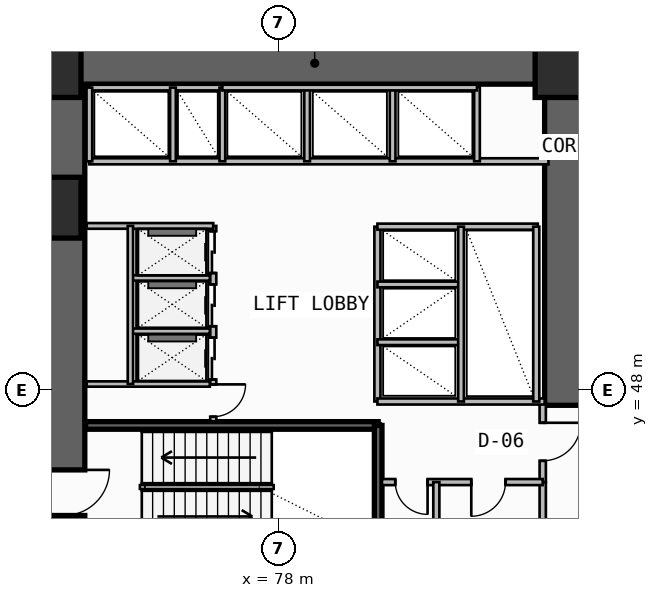
"""IFC4 building model, lengths in metres.
Left out: names, types, materials, properties, quantities, classifications, styles, units other than length and angle.
Written with IfcOpenShell. Run it as: python <this file> out.ifc"""

import sys

from ifc_helpers import new_model, si_unit, direction, frame, frame_2d, origin, origin_2d, place, context, subcontext, project, spatial, rectangle, extrude, element, fill, save


model = new_model("IFC4")
c1 = context("Model", 3, precision=1e-05, world=origin(), true_north=direction((0.0, 1.0)))
c2 = subcontext(c1, "Body", "Model", "MODEL_VIEW")
j1 = project(units=[si_unit("LENGTHUNIT", "METRE"), si_unit("PLANEANGLEUNIT", "RADIAN")], contexts=[c1])
p1 = place(None, origin())
s1 = spatial("IfcSite", under=j1, at=p1, CompositionType="ELEMENT")
p2 = place(p1, origin())
s2 = spatial("IfcBuilding", under=s1, at=p2, CompositionType="ELEMENT")
p3 = place(p2, frame((0.0, 0.0, 4.5)))
s3 = spatial("IfcBuildingStorey", under=s2, at=p3, CompositionType="ELEMENT", Elevation=4.5)
p4 = place(p3, frame((72.35, 43.35, -0.32), z_axis=(0.0, 0.0, 1.0), x_axis=(0.0, 1.0, 0.0)))
e1 = element("IfcWall", 1, at=p4, inside=s3, PredefinedType="SHEAR", context=c2, shape_type="SweptSolid", body=[
    extrude(rectangle(XDim=12.7, YDim=1.1, at=frame_2d((6.35, 0.0))), origin(), (0.0, 0.0, 1.0), 4.5),
])
p5 = place(p4, frame((1.35, 0.0, 0.32)))
e2 = element("IfcOpeningElement", 2, at=p5, cuts=e1, PredefinedType="OPENING", context=c2, shape_type="SweptSolid", body=[
    extrude(rectangle(XDim=1.2, YDim=2.2, at=frame_2d((0.6, 1.1))), frame((0.0, 0.56, 0.0), z_axis=(0.0, -1.0, 0.0), x_axis=(1.0, 0.0, 0.0)), (0.0, 0.0, 1.0), 1.12),
])
p6 = place(p3, frame((71.8, 56.6, -0.32), z_axis=(0.0, 0.0, 1.0), x_axis=(1.0, 0.0, 0.0)))
e3 = element("IfcWall", 3, at=p6, inside=s3, PredefinedType="SHEAR", context=c2, shape_type="SweptSolid", body=[
    extrude(rectangle(XDim=14.3, YDim=1.1, at=frame_2d((7.15, 0.0))), origin(), (0.0, 0.0, 1.0), 4.5),
])
p7 = place(p3, frame((85.55, 47.6, -0.32), z_axis=(0.0, 0.0, 1.0), x_axis=(0.0, 1.0, 0.0)))
e4 = element("IfcWall", 4, at=p7, inside=s3, PredefinedType="SHEAR", context=c2, shape_type="SweptSolid", body=[
    extrude(rectangle(XDim=8.45, YDim=1.1, at=frame_2d((4.225, 0.0))), origin(), (0.0, 0.0, 1.0), 4.5),
])
for number, where, z_axis, x_axis in (
    (5, (72.0, 52.8, 0.0), (0.0, 0.0, 1.0), (1.0, 0.0, 0.0)),
    (6, (72.0, 56.5, 0.0), (0.0, 0.0, 1.0), (1.0, 0.0, 0.0)),
    (7, (85.55, 56.5, 0.0), (0.0, 0.0, 1.0), (1.0, 0.0, 0.0)),
):
    element("IfcColumn", number, at=place(p3, frame(where, z_axis=z_axis, x_axis=x_axis)), inside=s3, PredefinedType="COLUMN", context=c2, shape_type="SweptSolid", body=[
        extrude(rectangle(XDim=1.6, YDim=1.6, at=origin_2d()), origin(), (0.0, 0.0, 1.0), 4.5),
    ])
p8 = place(p3, frame((72.92, 47.07, -0.32), z_axis=(0.0, 0.0, 1.0), x_axis=(1.0, 0.0, 0.0)))
e8 = element("IfcWall", 8, at=p8, inside=s3, PredefinedType="SOLIDWALL", context=c2, shape_type="SweptSolid", body=[
    extrude(rectangle(XDim=7.7, YDim=0.2, at=frame_2d((3.85, 0.0))), origin(), (0.0, 0.0, 1.0), 4.5),
])
p9 = place(p3, frame((80.62, 43.83, -0.32), z_axis=(0.0, 0.0, 1.0), x_axis=(0.0, 1.0, 0.0)))
e9 = element("IfcWall", 9, at=p9, inside=s3, PredefinedType="SOLIDWALL", context=c2, shape_type="SweptSolid", body=[
    extrude(rectangle(XDim=3.24, YDim=0.2, at=frame_2d((1.62, 0.0))), origin(), (0.0, 0.0, 1.0), 4.5),
])
p10 = place(p3, frame((84.95, 43.68, 0.0), z_axis=(0.0, 0.0, 1.0), x_axis=(0.0, 1.0, 0.0)))
e10 = element("IfcWall", 10, at=p10, inside=s3, PredefinedType="PLUMBINGWALL", context=c2, shape_type="SweptSolid", body=[
    extrude(rectangle(XDim=1.9, YDim=0.165, at=frame_2d((0.95, 0.0))), origin(), (0.0, 0.0, 1.0), 4.18),
])
p11 = place(p3, frame((84.95, 45.58, 0.0), z_axis=(0.0, 0.0, 1.0), x_axis=(0.0, 1.0, 0.0)))
e11 = element("IfcWall", 11, at=p11, inside=s3, PredefinedType="PARTITIONING", context=c2, shape_type="SweptSolid", body=[
    extrude(rectangle(XDim=2.12, YDim=0.165, at=frame_2d((1.06, 0.0))), origin(), (0.0, 0.0, 1.0), 4.18),
])
p12 = place(p11, frame((0.56, 0.0, 0.0)))
e12 = element("IfcOpeningElement", 12, at=p12, cuts=e11, PredefinedType="OPENING", context=c2, shape_type="SweptSolid", body=[
    extrude(rectangle(XDim=1.0, YDim=2.2, at=frame_2d((0.5, 1.1))), frame((0.0, 0.093, 0.0), z_axis=(0.0, -1.0, 0.0), x_axis=(1.0, 0.0, 0.0)), (0.0, 0.0, 1.0), 0.185),
])
p13 = place(p3, frame((80.72, 45.58, 0.0), z_axis=(0.0, 0.0, 1.0), x_axis=(1.0, 0.0, 0.0)))
e13 = element("IfcWall", 13, at=p13, inside=s3, PredefinedType="PLUMBINGWALL", context=c2, shape_type="SweptSolid", body=[
    extrude(rectangle(XDim=4.23, YDim=0.16, at=frame_2d((2.115, 0.0))), origin(), (0.0, 0.0, 1.0), 4.18),
])
p14 = place(p13, frame((0.35, 0.0, 0.0)))
e14 = element("IfcOpeningElement", 14, at=p14, cuts=e13, PredefinedType="OPENING", context=c2, shape_type="SweptSolid", body=[
    extrude(rectangle(XDim=0.85, YDim=2.05, at=frame_2d((0.425, 1.025))), frame((0.0, 0.09, 0.0), z_axis=(0.0, -1.0, 0.0), x_axis=(1.0, 0.0, 0.0)), (0.0, 0.0, 1.0), 0.18),
])
p15 = place(p13, frame((2.35, 0.0, 0.0)))
e15 = element("IfcOpeningElement", 15, at=p15, cuts=e13, PredefinedType="OPENING", context=c2, shape_type="SweptSolid", body=[
    extrude(rectangle(XDim=0.9, YDim=2.1, at=frame_2d((0.45, 1.05))), frame((0.0, 0.09, 0.0), z_axis=(0.0, -1.0, 0.0), x_axis=(1.0, 0.0, 0.0)), (0.0, 0.0, 1.0), 0.18),
])
p16 = place(p3, frame((82.15, 43.68, 0.0), z_axis=(0.0, 0.0, 1.0), x_axis=(0.0, 1.0, 0.0)))
e16 = element("IfcWall", 16, at=p16, inside=s3, PredefinedType="PLUMBINGWALL", context=c2, shape_type="SweptSolid", body=[
    extrude(rectangle(XDim=1.9, YDim=0.16, at=frame_2d((0.95, 0.0))), origin(), (0.0, 0.0, 1.0), 4.18),
])
p17 = place(p3, frame((76.28, 47.18, 0.0), z_axis=(0.0, 0.0, 1.0), x_axis=(0.0, 1.0, 0.0)))
e17 = element("IfcWall", 17, at=p17, inside=s3, PredefinedType="SOLIDWALL", context=c2, shape_type="SweptSolid", body=[
    extrude(rectangle(XDim=5.14, YDim=0.16, at=frame_2d((2.57, 0.0))), origin(), (0.0, 0.0, 1.0), 4.18),
])
p18 = place(p17, frame((1.1, 0.0, 0.0)))
e18 = element("IfcOpeningElement", 18, at=p18, cuts=e17, PredefinedType="OPENING", context=c2, shape_type="SweptSolid", body=[
    extrude(rectangle(XDim=1.1, YDim=2.25, at=frame_2d((0.55, 1.125))), frame((0.0, 0.09, 0.0), z_axis=(0.0, -1.0, 0.0), x_axis=(1.0, 0.0, 0.0)), (0.0, 0.0, 1.0), 0.18),
])
p19 = place(p17, frame((2.5, 0.0, 0.0)))
e19 = element("IfcOpeningElement", 19, at=p19, cuts=e17, PredefinedType="OPENING", context=c2, shape_type="SweptSolid", body=[
    extrude(rectangle(XDim=1.1, YDim=2.25, at=frame_2d((0.55, 1.125))), frame((0.0, 0.09, 0.0), z_axis=(0.0, -1.0, 0.0), x_axis=(1.0, 0.0, 0.0)), (0.0, 0.0, 1.0), 0.18),
])
p20 = place(p17, frame((3.9, 0.0, 0.0)))
e20 = element("IfcOpeningElement", 20, at=p20, cuts=e17, PredefinedType="OPENING", context=c2, shape_type="SweptSolid", body=[
    extrude(rectangle(XDim=1.1, YDim=2.25, at=frame_2d((0.55, 1.125))), frame((0.0, 0.09, 0.0), z_axis=(0.0, -1.0, 0.0), x_axis=(1.0, 0.0, 0.0)), (0.0, 0.0, 1.0), 0.18),
])
p21 = place(p17, frame((0.12, 0.0, 0.0)))
e21 = element("IfcOpeningElement", 21, at=p21, cuts=e17, PredefinedType="OPENING", context=c2, shape_type="SweptSolid", body=[
    extrude(rectangle(XDim=0.85, YDim=2.05, at=frame_2d((0.425, 1.025))), frame((0.0, 0.09, 0.0), z_axis=(0.0, -1.0, 0.0), x_axis=(1.0, 0.0, 0.0)), (0.0, 0.0, 1.0), 0.18),
])
p22 = place(p3, frame((72.95, 52.32, 0.0), z_axis=(0.0, 0.0, 1.0), x_axis=(1.0, 0.0, 0.0)))
e22 = element("IfcWall", 22, at=p22, inside=s3, PredefinedType="SOLIDWALL", context=c2, shape_type="SweptSolid", body=[
    extrude(rectangle(XDim=3.33, YDim=0.15, at=frame_2d((1.665, 0.0))), origin(), (0.0, 0.0, 1.0), 4.18),
])
p23 = place(p3, frame((72.95, 48.16, 0.0), z_axis=(0.0, 0.0, 1.0), x_axis=(1.0, 0.0, 0.0)))
e23 = element("IfcWall", 23, at=p23, inside=s3, PredefinedType="PLUMBINGWALL", context=c2, shape_type="SweptSolid", body=[
    extrude(rectangle(XDim=3.24, YDim=0.14, at=frame_2d((1.62, 0.0))), origin(), (0.0, 0.0, 1.0), 4.18),
])
for number, where, z_axis, x_axis in (
    (24, (74.15, 49.55, 0.0), (0.0, 0.0, 1.0), (1.0, 0.0, 0.0)),
    (25, (74.15, 50.95, 0.0), (0.0, 0.0, 1.0), (1.0, 0.0, 0.0)),
):
    element("IfcWall", number, at=place(p3, frame(where, z_axis=z_axis, x_axis=x_axis)), inside=s3, PredefinedType="PLUMBINGWALL", context=c2, shape_type="SweptSolid", body=[
        extrude(rectangle(XDim=2.04, YDim=0.14, at=frame_2d((1.02, 0.0))), origin(), (0.0, 0.0, 1.0), 4.18),
    ])
p24 = place(p3, frame((74.1, 48.16, 0.0), z_axis=(0.0, 0.0, 1.0), x_axis=(0.0, 1.0, 0.0)))
e26 = element("IfcWall", 26, at=p24, inside=s3, PredefinedType="PLUMBINGWALL", context=c2, shape_type="SweptSolid", body=[
    extrude(rectangle(XDim=4.16, YDim=0.14, at=frame_2d((2.08, 0.0))), origin(), (0.0, 0.0, 1.0), 4.18),
])
p25 = place(p3, frame((80.6, 47.7, 0.0), z_axis=(0.0, 0.0, 1.0), x_axis=(0.0, 1.0, 0.0)))
e27 = element("IfcWall", 27, at=p25, inside=s3, PredefinedType="SOLIDWALL", context=c2, shape_type="SweptSolid", body=[
    extrude(rectangle(XDim=4.6, YDim=0.16, at=frame_2d((2.3, 0.0))), origin(), (0.0, 0.0, 1.0), 4.18),
])
p26 = place(p3, frame((80.6, 47.7, 0.0), z_axis=(0.0, 0.0, 1.0), x_axis=(1.0, 0.0, 0.0)))
e28 = element("IfcWall", 28, at=p26, inside=s3, PredefinedType="SOLIDWALL", context=c2, shape_type="SweptSolid", body=[
    extrude(rectangle(XDim=4.4, YDim=0.16, at=frame_2d((2.2, 0.0))), origin(), (0.0, 0.0, 1.0), 4.18),
])
p27 = place(p3, frame((80.6, 52.3, 0.0), z_axis=(0.0, 0.0, 1.0), x_axis=(1.0, 0.0, 0.0)))
e29 = element("IfcWall", 29, at=p27, inside=s3, PredefinedType="SOLIDWALL", context=c2, shape_type="SweptSolid", body=[
    extrude(rectangle(XDim=4.22, YDim=0.16, at=frame_2d((2.11, 0.0))), origin(), (0.0, 0.0, 1.0), 4.18),
])
for number, where, z_axis, x_axis in (
    (30, (80.6, 49.26, 0.0), (0.0, 0.0, 1.0), (1.0, 0.0, 0.0)),
    (31, (80.6, 50.78, 0.0), (0.0, 0.0, 1.0), (1.0, 0.0, 0.0)),
):
    element("IfcWall", number, at=place(p3, frame(where, z_axis=z_axis, x_axis=x_axis)), inside=s3, PredefinedType="PLUMBINGWALL", context=c2, shape_type="SweptSolid", body=[
        extrude(rectangle(XDim=2.2, YDim=0.15, at=frame_2d((1.1, 0.0))), origin(), (0.0, 0.0, 1.0), 4.18),
    ])
p28 = place(p3, frame((82.8, 47.7, 0.0), z_axis=(0.0, 0.0, 1.0), x_axis=(0.0, 1.0, 0.0)))
e32 = element("IfcWall", 32, at=p28, inside=s3, PredefinedType="PLUMBINGWALL", context=c2, shape_type="SweptSolid", body=[
    extrude(rectangle(XDim=4.6, YDim=0.15, at=frame_2d((2.3, 0.0))), origin(), (0.0, 0.0, 1.0), 4.18),
])
p29 = place(p3, frame((84.78, 47.7, 0.0), z_axis=(0.0, 0.0, 1.0), x_axis=(0.0, 1.0, 0.0)))
e33 = element("IfcWall", 33, at=p29, inside=s3, PredefinedType="SOLIDWALL", context=c2, shape_type="SweptSolid", body=[
    extrude(rectangle(XDim=4.6, YDim=0.16, at=frame_2d((2.3, 0.0))), origin(), (0.0, 0.0, 1.0), 4.18),
])
p30 = place(p3, frame((73.02, 54.02, 0.0), z_axis=(0.0, 0.0, 1.0), x_axis=(1.0, 0.0, 0.0)))
e34 = element("IfcWall", 34, at=p30, inside=s3, PredefinedType="SOLIDWALL", context=c2, shape_type="SweptSolid", body=[
    extrude(rectangle(XDim=12.08, YDim=0.16, at=frame_2d((6.04, 0.0))), origin(), (0.0, 0.0, 1.0), 4.18),
])
p31 = place(p3, frame((73.02, 55.96, 0.0), z_axis=(0.0, 0.0, 1.0), x_axis=(1.0, 0.0, 0.0)))
e35 = element("IfcWall", 35, at=p31, inside=s3, PredefinedType="SOLIDWALL", context=c2, shape_type="SweptSolid", body=[
    extrude(rectangle(XDim=3.5, YDim=0.15, at=frame_2d((1.75, 0.0))), origin(), (0.0, 0.0, 1.0), 4.18),
])
p32 = place(p3, frame((73.02, 54.02, 0.0), z_axis=(0.0, 0.0, 1.0), x_axis=(0.0, 1.0, 0.0)))
e36 = element("IfcWall", 36, at=p32, inside=s3, PredefinedType="PLUMBINGWALL", context=c2, shape_type="SweptSolid", body=[
    extrude(rectangle(XDim=1.94, YDim=0.15, at=frame_2d((0.97, 0.0))), origin(), (0.0, 0.0, 1.0), 4.18),
])
p33 = place(p3, frame((76.52, 54.02, 0.0), z_axis=(0.0, 0.0, 1.0), x_axis=(0.0, 1.0, 0.0)))
e37 = element("IfcWall", 37, at=p33, inside=s3, PredefinedType="SOLIDWALL", context=c2, shape_type="SweptSolid", body=[
    extrude(rectangle(XDim=1.94, YDim=0.15, at=frame_2d((0.97, 0.0))), origin(), (0.0, 0.0, 1.0), 4.18),
])
p34 = place(p3, frame((75.22, 54.02, 0.0), z_axis=(0.0, 0.0, 1.0), x_axis=(0.0, 1.0, 0.0)))
e38 = element("IfcWall", 38, at=p34, inside=s3, PredefinedType="PLUMBINGWALL", context=c2, shape_type="SweptSolid", body=[
    extrude(rectangle(XDim=1.94, YDim=0.15, at=frame_2d((0.97, 0.0))), origin(), (0.0, 0.0, 1.0), 4.18),
])
for number, where, z_axis, x_axis in (
    (39, (78.75, 54.02, 0.0), (0.0, 0.0, 1.0), (0.0, 1.0, 0.0)),
    (40, (81.0, 54.02, 0.0), (0.0, 0.0, 1.0), (0.0, 1.0, 0.0)),
):
    element("IfcWall", number, at=place(p3, frame(where, z_axis=z_axis, x_axis=x_axis)), inside=s3, PredefinedType="PLUMBINGWALL", context=c2, shape_type="SweptSolid", body=[
        extrude(rectangle(XDim=1.96, YDim=0.15, at=frame_2d((0.98, 0.0))), origin(), (0.0, 0.0, 1.0), 4.18),
    ])
p35 = place(p3, frame((83.22, 54.02, 0.0), z_axis=(0.0, 0.0, 1.0), x_axis=(0.0, 1.0, 0.0)))
e41 = element("IfcWall", 41, at=p35, inside=s3, PredefinedType="SOLIDWALL", context=c2, shape_type="SweptSolid", body=[
    extrude(rectangle(XDim=1.96, YDim=0.15, at=frame_2d((0.98, 0.0))), origin(), (0.0, 0.0, 1.0), 4.18),
])
p36 = place(p3, frame((76.52, 55.96, 0.0), z_axis=(0.0, 0.0, 1.0), x_axis=(1.0, 0.0, 0.0)))
e42 = element("IfcWall", 42, at=p36, inside=s3, PredefinedType="SOLIDWALL", context=c2, shape_type="SweptSolid", body=[
    extrude(rectangle(XDim=6.7, YDim=0.15, at=frame_2d((3.35, 0.0))), origin(), (0.0, 0.0, 1.0), 4.18),
])
p37 = place(p5, frame((1.2, 0.0, 0.0), z_axis=(0.0, 0.0, 1.0), x_axis=(-1.0, 0.0, 0.0)))
e43 = element("IfcDoor", 43, at=p37, inside=s3, OperationType="SINGLE_SWING_LEFT", PredefinedType="USERDEFINED", context=c2, shape_type="SweptSolid", body=[
    extrude(rectangle(XDim=1.2, YDim=2.2, at=frame_2d((0.6, 1.1))), frame((0.0, 0.025, 0.0), z_axis=(0.0, -1.0, 0.0), x_axis=(1.0, 0.0, 0.0)), (0.0, 0.0, 1.0), 0.05),
])
fill(e2, e43)
p38 = place(p12, frame((1.0, 0.0, 0.0), z_axis=(0.0, 0.0, 1.0), x_axis=(-1.0, 0.0, 0.0)))
e44 = element("IfcDoor", 44, at=p38, inside=s3, OperationType="SINGLE_SWING_LEFT", PredefinedType="DOOR", context=c2, shape_type="SweptSolid", body=[
    extrude(rectangle(XDim=1.0, YDim=2.2, at=frame_2d((0.5, 1.1))), frame((0.0, 0.025, 0.0), z_axis=(0.0, -1.0, 0.0), x_axis=(1.0, 0.0, 0.0)), (0.0, 0.0, 1.0), 0.05),
])
fill(e12, e44)
p39 = place(p14, frame((0.85, 0.0, 0.0), z_axis=(0.0, 0.0, 1.0), x_axis=(-1.0, 0.0, 0.0)))
e45 = element("IfcDoor", 45, at=p39, inside=s3, OperationType="SINGLE_SWING_LEFT", PredefinedType="DOOR", context=c2, shape_type="SweptSolid", body=[
    extrude(rectangle(XDim=0.85, YDim=2.05, at=frame_2d((0.425, 1.025))), frame((0.0, 0.025, 0.0), z_axis=(0.0, -1.0, 0.0), x_axis=(1.0, 0.0, 0.0)), (0.0, 0.0, 1.0), 0.05),
])
fill(e14, e45)
p40 = place(p15, frame((0.9, 0.0, 0.0), z_axis=(0.0, 0.0, 1.0), x_axis=(-1.0, 0.0, 0.0)))
e46 = element("IfcDoor", 46, at=p40, inside=s3, OperationType="SINGLE_SWING_RIGHT", PredefinedType="DOOR", context=c2, shape_type="SweptSolid", body=[
    extrude(rectangle(XDim=0.9, YDim=2.1, at=frame_2d((0.45, 1.05))), frame((0.0, 0.025, 0.0), z_axis=(0.0, -1.0, 0.0), x_axis=(1.0, 0.0, 0.0)), (0.0, 0.0, 1.0), 0.05),
])
fill(e15, e46)
p41 = place(p18, origin())
e47 = element("IfcDoor", 47, at=p41, inside=s3, OperationType="DOUBLE_DOOR_SLIDING", PredefinedType="DOOR", context=c2, shape_type="SweptSolid", body=[
    extrude(rectangle(XDim=1.1, YDim=2.25, at=frame_2d((0.55, 1.125))), frame((0.0, 0.025, 0.0), z_axis=(0.0, -1.0, 0.0), x_axis=(1.0, 0.0, 0.0)), (0.0, 0.0, 1.0), 0.05),
])
fill(e18, e47)
p42 = place(p19, origin())
e48 = element("IfcDoor", 48, at=p42, inside=s3, OperationType="DOUBLE_DOOR_SLIDING", PredefinedType="DOOR", context=c2, shape_type="SweptSolid", body=[
    extrude(rectangle(XDim=1.1, YDim=2.25, at=frame_2d((0.55, 1.125))), frame((0.0, 0.025, 0.0), z_axis=(0.0, -1.0, 0.0), x_axis=(1.0, 0.0, 0.0)), (0.0, 0.0, 1.0), 0.05),
])
fill(e19, e48)
p43 = place(p20, origin())
e49 = element("IfcDoor", 49, at=p43, inside=s3, OperationType="DOUBLE_DOOR_SLIDING", PredefinedType="DOOR", context=c2, shape_type="SweptSolid", body=[
    extrude(rectangle(XDim=1.1, YDim=2.25, at=frame_2d((0.55, 1.125))), frame((0.0, 0.025, 0.0), z_axis=(0.0, -1.0, 0.0), x_axis=(1.0, 0.0, 0.0)), (0.0, 0.0, 1.0), 0.05),
])
fill(e20, e49)
p44 = place(p21, frame((0.85, 0.0, 0.0), z_axis=(0.0, 0.0, 1.0), x_axis=(-1.0, 0.0, 0.0)))
e50 = element("IfcDoor", 50, at=p44, inside=s3, OperationType="SINGLE_SWING_LEFT", PredefinedType="DOOR", context=c2, shape_type="SweptSolid", body=[
    extrude(rectangle(XDim=0.85, YDim=2.05, at=frame_2d((0.425, 1.025))), frame((0.0, 0.025, 0.0), z_axis=(0.0, -1.0, 0.0), x_axis=(1.0, 0.0, 0.0)), (0.0, 0.0, 1.0), 0.05),
])
fill(e21, e50)
save(model, sys.argv[1])
